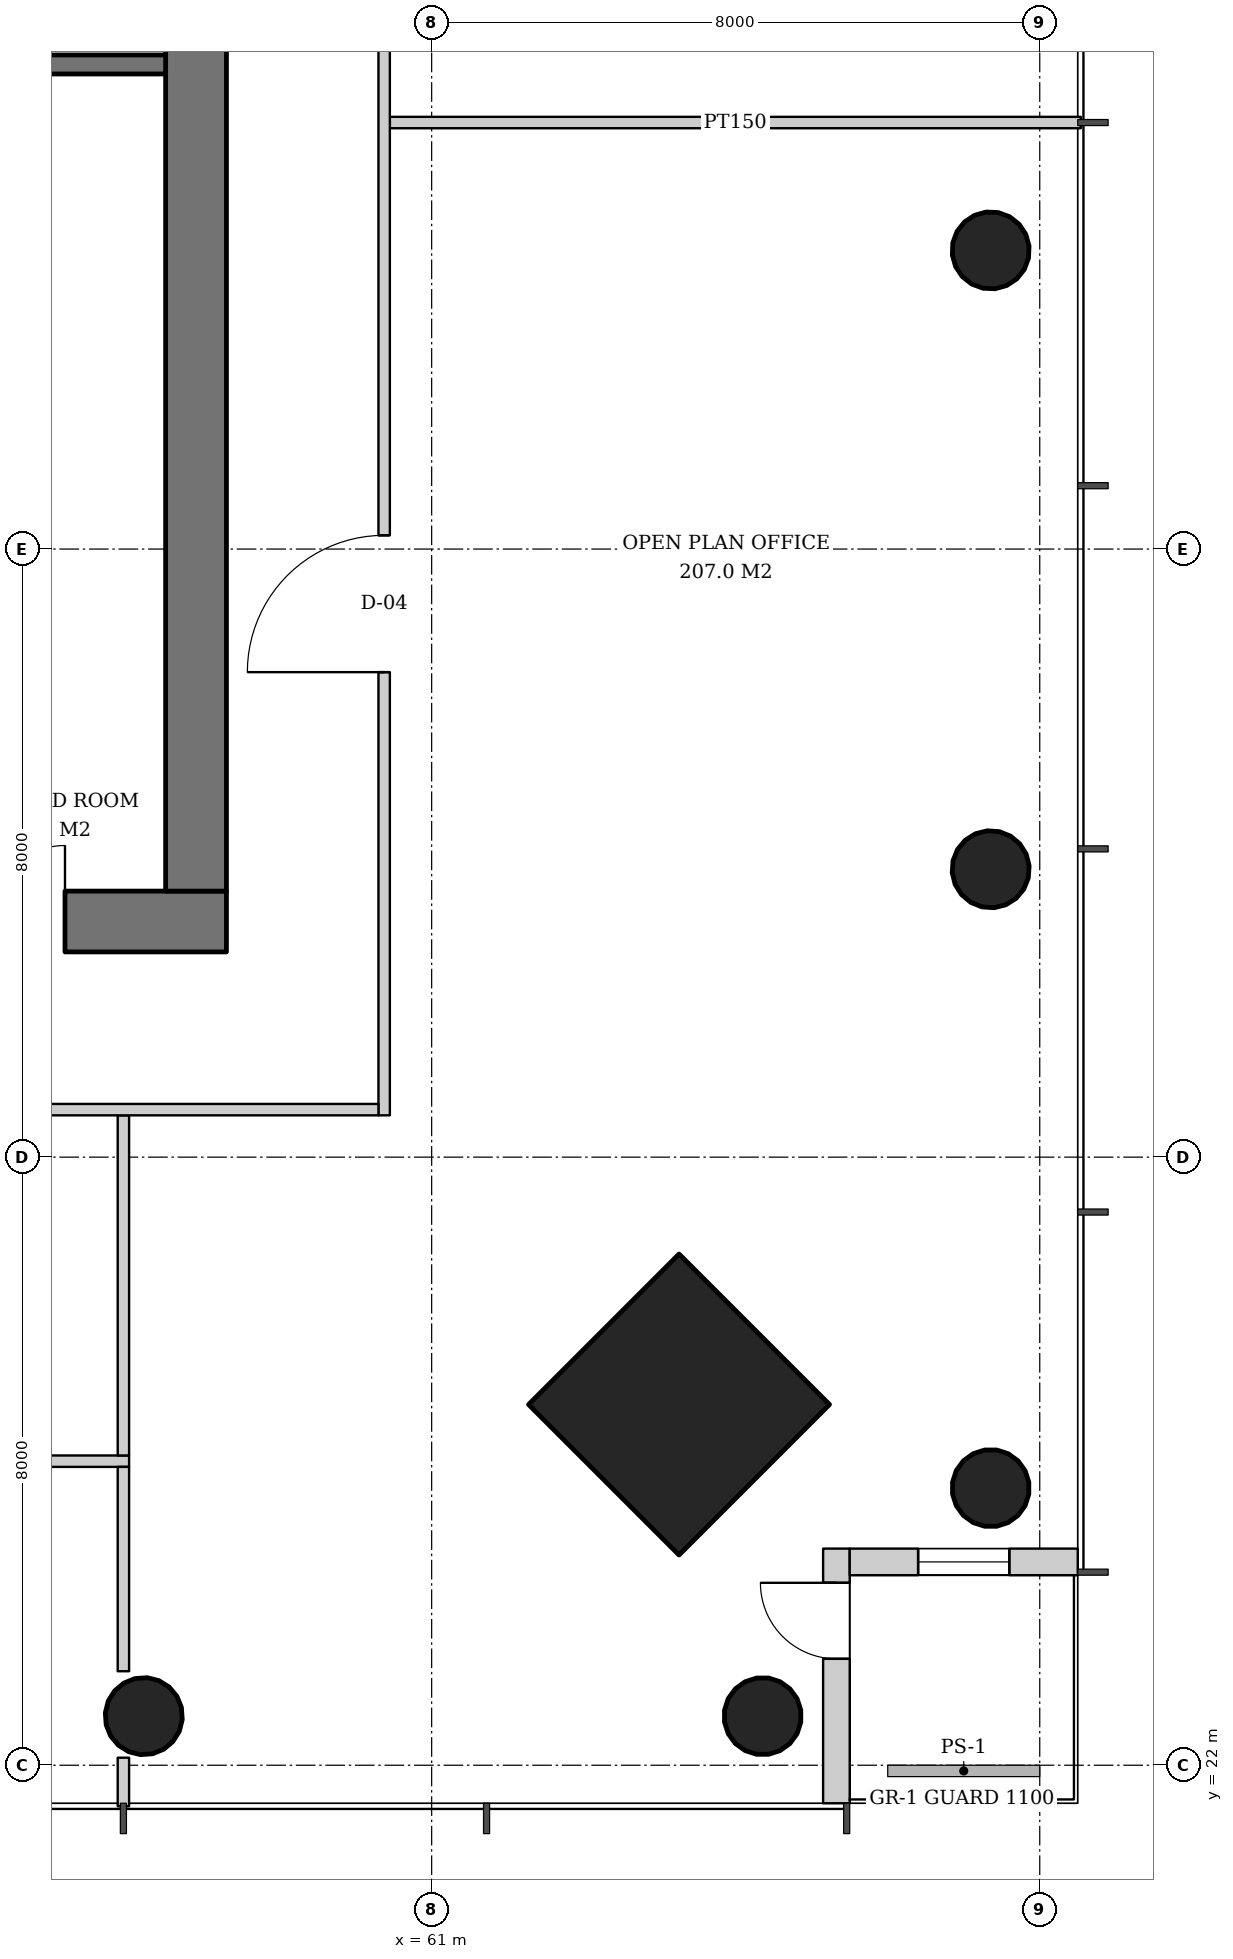
"""IFC4 building model, lengths in metres.
Left out: names, types, materials, properties, quantities, classifications, styles, units other than length and angle.
Written with IfcOpenShell. Run it as: python <this file> out.ifc"""

import sys

from ifc_helpers import new_model, si_unit, direction, frame, frame_2d, origin, origin_2d, place, context, subcontext, project, spatial, rectangle, hollow_circle, extrude, element, fill, save


model = new_model("IFC4")
c1 = context("Model", 3, precision=1e-05, world=origin(), true_north=direction((0.0, 1.0)))
c2 = subcontext(c1, "Body", "Model", "MODEL_VIEW")
j1 = project(units=[si_unit("LENGTHUNIT", "METRE"), si_unit("PLANEANGLEUNIT", "RADIAN")], contexts=[c1])
p1 = place(None, origin())
s1 = spatial("IfcSite", under=j1, at=p1, CompositionType="ELEMENT")
p2 = place(p1, origin())
s2 = spatial("IfcBuilding", under=s1, at=p2, CompositionType="ELEMENT")
p3 = place(p2, frame((0.0, 0.0, 40.0)))
s3 = spatial("IfcBuildingStorey", under=s2, at=p3, CompositionType="ELEMENT", Elevation=40.0)
p4 = place(p3, frame((68.393, 25.607, 0.0), z_axis=(-0.031898107953, 0.031898107953, 0.998981992539), x_axis=(-0.707106781187, -0.707106781187, 0.0)))
e1 = element("IfcColumn", 1, at=p4, inside=s3, PredefinedType="COLUMN", context=c2, shape_type="SweptSolid", body=[
    extrude(hollow_circle(Radius=0.508, WallThickness=0.04, at=origin_2d()), origin(), (0.0, 0.0, 1.0), 3.804),
])
p5 = place(p3, frame((68.393, 33.764, 0.0), z_axis=(-0.031908506785, 0.019132263625, 0.999307662176), x_axis=(-0.514241961696, -0.857645150882, 0.0)))
e2 = element("IfcColumn", 2, at=p5, inside=s3, PredefinedType="COLUMN", context=c2, shape_type="SweptSolid", body=[
    extrude(hollow_circle(Radius=0.508, WallThickness=0.04, at=origin_2d()), origin(), (0.0, 0.0, 1.0), 3.803),
])
p6 = place(p3, frame((68.393, 41.921, 0.0), z_axis=(-0.031913690376, 0.006421265669, 0.999470001408), x_axis=(-0.197254006954, -0.980352414563, 0.0)))
e3 = element("IfcColumn", 3, at=p6, inside=s3, PredefinedType="COLUMN", context=c2, shape_type="SweptSolid", body=[
    extrude(hollow_circle(Radius=0.508, WallThickness=0.04, at=origin_2d()), origin(), (0.0, 0.0, 1.0), 3.802),
])
p7 = place(p3, frame((64.293, 26.707, 0.0), z_axis=(-0.031962158256, 0.031962158256, 0.998977898093), x_axis=(-0.707106781187, -0.707106781187, 0.0)))
e4 = element("IfcColumn", 4, at=p7, inside=s3, PredefinedType="COLUMN", context=c2, shape_type="SweptSolid", body=[
    extrude(rectangle(XDim=2.8, YDim=2.8, at=origin_2d()), origin(), (0.0, 0.0, 1.0), 3.804),
])
p8 = place(p3, frame((65.393, 22.607, 0.0), z_axis=(-0.031898107953, 0.031898107953, 0.998981992539), x_axis=(-0.707106781187, -0.707106781187, 0.0)))
e5 = element("IfcColumn", 5, at=p8, inside=s3, PredefinedType="COLUMN", context=c2, shape_type="SweptSolid", body=[
    extrude(hollow_circle(Radius=0.508, WallThickness=0.04, at=origin_2d()), origin(), (0.0, 0.0, 1.0), 3.804),
])
p9 = place(p3, frame((57.236, 22.607, 0.0), z_axis=(-0.019132263625, 0.031908506785, 0.999307662176), x_axis=(-0.857645150882, -0.514241961696, 0.0)))
e6 = element("IfcColumn", 6, at=p9, inside=s3, PredefinedType="COLUMN", context=c2, shape_type="SweptSolid", body=[
    extrude(hollow_circle(Radius=0.508, WallThickness=0.04, at=origin_2d()), origin(), (0.0, 0.0, 1.0), 3.803),
])
p10 = place(p3, frame((31.7, 33.1, 0.0), z_axis=(0.0, 0.0, 1.0), x_axis=(1.0, 0.0, 0.0)))
e7 = element("IfcWall", 7, at=p10, inside=s3, PredefinedType="SHEAR", context=c2, shape_type="SweptSolid", body=[
    extrude(rectangle(XDim=26.6, YDim=0.8, at=frame_2d((13.3, 0.0))), origin(), (0.0, 0.0, 1.0), 3.8),
])
p11 = place(p10, frame((7.3, 0.0, 0.0)))
e8 = element("IfcOpeningElement", 8, at=p11, cuts=e7, PredefinedType="OPENING", context=c2, shape_type="SweptSolid", body=[
    extrude(rectangle(XDim=1.0, YDim=2.1, at=frame_2d((0.5, 1.05))), frame((0.0, 0.41, 0.0), z_axis=(0.0, -1.0, 0.0), x_axis=(1.0, 0.0, 0.0)), (0.0, 0.0, 1.0), 0.82),
])
p12 = place(p10, frame((18.75, 0.0, 0.0)))
e9 = element("IfcOpeningElement", 9, at=p12, cuts=e7, PredefinedType="OPENING", context=c2, shape_type="SweptSolid", body=[
    extrude(rectangle(XDim=1.0, YDim=2.1, at=frame_2d((0.5, 1.05))), frame((0.0, 0.41, 0.0), z_axis=(0.0, -1.0, 0.0), x_axis=(1.0, 0.0, 0.0)), (0.0, 0.0, 1.0), 0.82),
])
p13 = place(p10, frame((1.9, 0.0, 0.0)))
e10 = element("IfcOpeningElement", 10, at=p13, cuts=e7, PredefinedType="OPENING", context=c2, shape_type="SweptSolid", body=[
    extrude(rectangle(XDim=1.0, YDim=2.1, at=frame_2d((0.5, 1.05))), frame((0.0, 0.41, 0.0), z_axis=(0.0, -1.0, 0.0), x_axis=(1.0, 0.0, 0.0)), (0.0, 0.0, 1.0), 0.82),
])
p14 = place(p10, frame((4.725, 0.0, 0.0)))
e11 = element("IfcOpeningElement", 11, at=p14, cuts=e7, PredefinedType="OPENING", context=c2, shape_type="SweptSolid", body=[
    extrude(rectangle(XDim=1.0, YDim=2.1, at=frame_2d((0.5, 1.05))), frame((0.0, 0.41, 0.0), z_axis=(0.0, -1.0, 0.0), x_axis=(1.0, 0.0, 0.0)), (0.0, 0.0, 1.0), 0.82),
])
p15 = place(p10, frame((12.44, 0.0, 0.0)))
e12 = element("IfcOpeningElement", 12, at=p15, cuts=e7, PredefinedType="OPENING", context=c2, shape_type="SweptSolid", body=[
    extrude(rectangle(XDim=1.0, YDim=2.1, at=frame_2d((0.5, 1.05))), frame((0.0, 0.41, 0.0), z_axis=(0.0, -1.0, 0.0), x_axis=(1.0, 0.0, 0.0)), (0.0, 0.0, 1.0), 0.82),
])
p16 = place(p10, frame((20.626, 0.0, 0.0)))
e13 = element("IfcOpeningElement", 13, at=p16, cuts=e7, PredefinedType="OPENING", context=c2, shape_type="SweptSolid", body=[
    extrude(rectangle(XDim=1.0, YDim=2.1, at=frame_2d((0.5, 1.05))), frame((0.0, 0.41, 0.0), z_axis=(0.0, -1.0, 0.0), x_axis=(1.0, 0.0, 0.0)), (0.0, 0.0, 1.0), 0.82),
])
p17 = place(p10, frame((23.476, 0.0, 0.0)))
e14 = element("IfcOpeningElement", 14, at=p17, cuts=e7, PredefinedType="OPENING", context=c2, shape_type="SweptSolid", body=[
    extrude(rectangle(XDim=1.0, YDim=2.1, at=frame_2d((0.5, 1.05))), frame((0.0, 0.41, 0.0), z_axis=(0.0, -1.0, 0.0), x_axis=(1.0, 0.0, 0.0)), (0.0, 0.0, 1.0), 0.82),
])
p18 = place(p3, frame((57.9, 33.5, 0.0), z_axis=(0.0, 0.0, 1.0), x_axis=(0.0, 1.0, 0.0)))
e15 = element("IfcWall", 15, at=p18, inside=s3, PredefinedType="SHEAR", context=c2, shape_type="SweptSolid", body=[
    extrude(rectangle(XDim=25.0, YDim=0.8, at=frame_2d((12.5, 0.0))), origin(), (0.0, 0.0, 1.0), 3.8),
])
p19 = place(p18, frame((11.6, 0.0, 0.0)))
e16 = element("IfcOpeningElement", 16, at=p19, cuts=e15, PredefinedType="OPENING", context=c2, shape_type="SweptSolid", body=[
    extrude(rectangle(XDim=1.8, YDim=2.4, at=frame_2d((0.9, 1.2))), frame((0.0, 0.41, 0.0), z_axis=(0.0, -1.0, 0.0), x_axis=(1.0, 0.0, 0.0)), (0.0, 0.0, 1.0), 0.82),
])
p20 = place(p3, frame((66.325, 21.5, 0.0), z_axis=(0.0, 0.0, 1.0), x_axis=(0.0, 1.0, 0.0)))
e17 = element("IfcWall", 17, at=p20, inside=s3, PredefinedType="SOLIDWALL", context=c2, shape_type="SweptSolid", body=[
    extrude(rectangle(XDim=3.35, YDim=0.35, at=frame_2d((1.675, 0.0))), origin(), (0.0, 0.0, 1.0), 3.62),
])
p21 = place(p20, frame((1.9, 0.0, 0.0)))
e18 = element("IfcOpeningElement", 18, at=p21, cuts=e17, PredefinedType="OPENING", context=c2, shape_type="SweptSolid", body=[
    extrude(rectangle(XDim=1.0, YDim=2.4, at=frame_2d((0.5, 1.2))), frame((0.0, 0.185, 0.0), z_axis=(0.0, -1.0, 0.0), x_axis=(1.0, 0.0, 0.0)), (0.0, 0.0, 1.0), 0.37),
])
p22 = place(p3, frame((66.5, 24.675, 0.0), z_axis=(0.0, 0.0, 1.0), x_axis=(1.0, 0.0, 0.0)))
e19 = element("IfcWall", 19, at=p22, inside=s3, PredefinedType="SOLIDWALL", context=c2, shape_type="SweptSolid", body=[
    extrude(rectangle(XDim=3.0, YDim=0.35, at=frame_2d((1.5, 0.0))), origin(), (0.0, 0.0, 1.0), 3.62),
])
p23 = place(p22, frame((0.9, 0.0, 0.6)))
e20 = element("IfcOpeningElement", 20, at=p23, cuts=e19, PredefinedType="OPENING", context=c2, shape_type="SweptSolid", body=[
    extrude(rectangle(XDim=1.2, YDim=2.55, at=frame_2d((0.6, 1.275))), frame((0.0, 0.185, 0.0), z_axis=(0.0, -1.0, 0.0), x_axis=(1.0, 0.0, 0.0)), (0.0, 0.0, 1.0), 0.37),
])
p24 = place(p3, frame((54.9, 44.375, 0.0), z_axis=(0.0, 0.0, 1.0), x_axis=(1.0, 0.0, 0.0)))
e21 = element("IfcWall", 21, at=p24, inside=s3, PredefinedType="SOLIDWALL", context=c2, shape_type="SweptSolid", body=[
    extrude(rectangle(XDim=2.6, YDim=0.25, at=frame_2d((1.3, 0.0))), origin(), (0.0, 0.0, 1.0), 3.62),
])
p25 = place(p3, frame((32.98, 26.0, 0.0), z_axis=(0.0, 0.0, 1.0), x_axis=(1.0, 0.0, 0.0)))
e22 = element("IfcWall", 22, at=p25, inside=s3, PredefinedType="PARTITIONING", context=c2, shape_type="SweptSolid", body=[
    extrude(rectangle(XDim=24.039, YDim=0.15, at=frame_2d((12.02, 0.0))), origin(), (0.0, 0.0, 1.0), 2.806),
])
p26 = place(p25, frame((1.964, 0.0, 0.0)))
e23 = element("IfcOpeningElement", 23, at=p26, cuts=e22, PredefinedType="OPENING", context=c2, shape_type="SweptSolid", body=[
    extrude(rectangle(XDim=1.0, YDim=2.1, at=frame_2d((0.5, 1.05))), frame((0.0, 0.085, 0.0), z_axis=(0.0, -1.0, 0.0), x_axis=(1.0, 0.0, 0.0)), (0.0, 0.0, 1.0), 0.17),
])
p27 = place(p25, frame((6.742, 0.0, 0.0)))
e24 = element("IfcOpeningElement", 24, at=p27, cuts=e22, PredefinedType="OPENING", context=c2, shape_type="SweptSolid", body=[
    extrude(rectangle(XDim=1.0, YDim=2.1, at=frame_2d((0.5, 1.05))), frame((0.0, 0.085, 0.0), z_axis=(0.0, -1.0, 0.0), x_axis=(1.0, 0.0, 0.0)), (0.0, 0.0, 1.0), 0.17),
])
p28 = place(p25, frame((11.52, 0.0, 0.0)))
e25 = element("IfcOpeningElement", 25, at=p28, cuts=e22, PredefinedType="OPENING", context=c2, shape_type="SweptSolid", body=[
    extrude(rectangle(XDim=1.0, YDim=2.1, at=frame_2d((0.5, 1.05))), frame((0.0, 0.085, 0.0), z_axis=(0.0, -1.0, 0.0), x_axis=(1.0, 0.0, 0.0)), (0.0, 0.0, 1.0), 0.17),
])
p29 = place(p25, frame((16.297, 0.0, 0.0)))
e26 = element("IfcOpeningElement", 26, at=p29, cuts=e22, PredefinedType="OPENING", context=c2, shape_type="SweptSolid", body=[
    extrude(rectangle(XDim=1.0, YDim=2.1, at=frame_2d((0.5, 1.05))), frame((0.0, 0.085, 0.0), z_axis=(0.0, -1.0, 0.0), x_axis=(1.0, 0.0, 0.0)), (0.0, 0.0, 1.0), 0.17),
])
p30 = place(p25, frame((21.075, 0.0, 0.0)))
e27 = element("IfcOpeningElement", 27, at=p30, cuts=e22, PredefinedType="OPENING", context=c2, shape_type="SweptSolid", body=[
    extrude(rectangle(XDim=1.0, YDim=2.1, at=frame_2d((0.5, 1.05))), frame((0.0, 0.085, 0.0), z_axis=(0.0, -1.0, 0.0), x_axis=(1.0, 0.0, 0.0)), (0.0, 0.0, 1.0), 0.17),
])
p31 = place(p3, frame((56.944, 25.925, 0.0), z_axis=(0.0, 0.0, 1.0), x_axis=(0.0, -1.0, 0.0)))
e28 = element("IfcWall", 28, at=p31, inside=s3, PredefinedType="PARTITIONING", context=c2, shape_type="SweptSolid", body=[
    extrude(rectangle(XDim=2.688, YDim=0.15, at=frame_2d((1.344, 0.0))), origin(), (0.0, 0.0, 1.0), 3.62),
])
p32 = place(p3, frame((56.944, 22.099, 0.0), z_axis=(0.0, 0.0, 1.0), x_axis=(0.0, -1.0, 0.0)))
e29 = element("IfcWall", 29, at=p32, inside=s3, PredefinedType="PARTITIONING", context=c2, shape_type="SweptSolid", body=[
    extrude(rectangle(XDim=0.639, YDim=0.15, at=frame_2d((0.32, 0.0))), origin(), (0.0, 0.0, 1.0), 3.62),
])
p33 = place(p3, frame((60.45, 43.611, 0.0), z_axis=(0.0, 0.0, 1.0), x_axis=(1.0, 0.0, 0.0)))
e30 = element("IfcWall", 30, at=p33, inside=s3, PredefinedType="PARTITIONING", context=c2, shape_type="SweptSolid", body=[
    extrude(rectangle(XDim=9.09, YDim=0.15, at=frame_2d((4.545, 0.0))), origin(), (0.0, 0.0, 1.0), 3.02),
])
p34 = place(p3, frame((56.944, 30.55, 0.0), z_axis=(0.0, 0.0, 1.0), x_axis=(0.0, -1.0, 0.0)))
e31 = element("IfcWall", 31, at=p34, inside=s3, PredefinedType="PARTITIONING", context=c2, shape_type="SweptSolid", body=[
    extrude(rectangle(XDim=4.475, YDim=0.15, at=frame_2d((2.238, 0.0))), origin(), (0.0, 0.0, 1.0), 3.62),
])
p35 = place(p3, frame((60.375, 30.55, 0.0), z_axis=(0.0, 0.0, 1.0), x_axis=(0.0, 1.0, 0.0)))
e32 = element("IfcWall", 32, at=p35, inside=s3, PredefinedType="PARTITIONING", context=c2, shape_type="SweptSolid", body=[
    extrude(rectangle(XDim=30.75, YDim=0.15, at=frame_2d((15.375, 0.0))), origin(), (0.0, 0.0, 1.0), 2.612),
])
p36 = place(p35, frame((5.831, 0.0, 0.0)))
e33 = element("IfcOpeningElement", 33, at=p36, cuts=e32, PredefinedType="OPENING", context=c2, shape_type="SweptSolid", body=[
    extrude(rectangle(XDim=1.8, YDim=2.4, at=frame_2d((0.9, 1.2))), frame((0.0, 0.085, 0.0), z_axis=(0.0, -1.0, 0.0), x_axis=(1.0, 0.0, 0.0)), (0.0, 0.0, 1.0), 0.17),
])
p37 = place(p3, frame((29.55, 30.625, 0.0), z_axis=(0.0, 0.0, 1.0), x_axis=(1.0, 0.0, 0.0)))
e34 = element("IfcWall", 34, at=p37, inside=s3, PredefinedType="PARTITIONING", context=c2, shape_type="SweptSolid", body=[
    extrude(rectangle(XDim=30.75, YDim=0.15, at=frame_2d((15.375, 0.0))), origin(), (0.0, 0.0, 1.0), 2.612),
])
p38 = place(p37, frame((12.997, 0.0, 0.0)))
e35 = element("IfcOpeningElement", 35, at=p38, cuts=e34, PredefinedType="OPENING", context=c2, shape_type="SweptSolid", body=[
    extrude(rectangle(XDim=1.8, YDim=2.4, at=frame_2d((0.9, 1.2))), frame((0.0, 0.085, 0.0), z_axis=(0.0, -1.0, 0.0), x_axis=(1.0, 0.0, 0.0)), (0.0, 0.0, 1.0), 0.17),
])
p39 = place(p21, origin())
e36 = element("IfcDoor", 36, at=p39, inside=s3, OperationType="SINGLE_SWING_RIGHT", PredefinedType="DOOR", context=c2, shape_type="SweptSolid", body=[
    extrude(rectangle(XDim=1.0, YDim=2.4, at=frame_2d((0.5, 1.2))), frame((0.0, 0.025, 0.0), z_axis=(0.0, -1.0, 0.0), x_axis=(1.0, 0.0, 0.0)), (0.0, 0.0, 1.0), 0.05),
])
fill(e18, e36)
p40 = place(p23, origin())
e37 = element("IfcWindow", 37, at=p40, inside=s3, PartitioningType="SINGLE_PANEL", PredefinedType="WINDOW", context=c2, shape_type="SweptSolid", body=[
    extrude(rectangle(XDim=1.2, YDim=2.55, at=frame_2d((0.6, 1.275))), frame((0.0, 0.03, 0.0), z_axis=(0.0, -1.0, 0.0), x_axis=(1.0, 0.0, 0.0)), (0.0, 0.0, 1.0), 0.06),
])
fill(e20, e37)
p41 = place(p17, origin())
e38 = element("IfcDoor", 38, at=p41, inside=s3, OperationType="SINGLE_SWING_RIGHT", PredefinedType="DOOR", context=c2, shape_type="SweptSolid", body=[
    extrude(rectangle(XDim=1.0, YDim=2.1, at=frame_2d((0.5, 1.05))), frame((0.0, 0.39, 0.0), z_axis=(0.0, -1.0, 0.0), x_axis=(1.0, 0.0, 0.0)), (0.0, 0.0, 1.0), 0.05),
])
fill(e14, e38)
p42 = place(p36, origin())
e39 = element("IfcDoor", 39, at=p42, inside=s3, OperationType="DOUBLE_DOOR_SINGLE_SWING", PredefinedType="DOOR", context=c2, shape_type="SweptSolid", body=[
    extrude(rectangle(XDim=1.8, YDim=2.4, at=frame_2d((0.9, 1.2))), frame((0.0, 0.025, 0.0), z_axis=(0.0, -1.0, 0.0), x_axis=(1.0, 0.0, 0.0)), (0.0, 0.0, 1.0), 0.05),
])
fill(e33, e39)
save(model, sys.argv[1])
